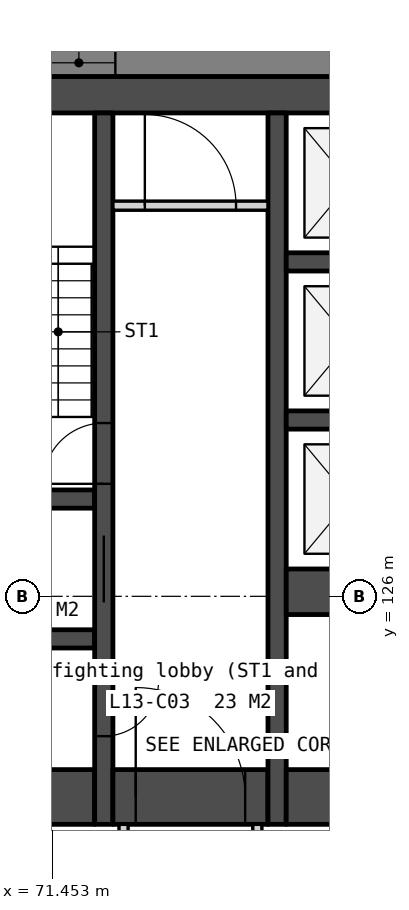
"""IFC4 building model, lengths in metres.
Left out: names, types, materials, properties, quantities, classifications, styles, units other than length and angle.
Written with IfcOpenShell. Run it as: python <this file> out.ifc"""

import sys

from ifc_helpers import new_model, si_unit, direction, frame, frame_2d, origin, place, context, subcontext, project, spatial, polyline, rectangle, outline, extrude, element, fill, save


model = new_model("IFC4")
c1 = context("Model", 3, precision=1e-05, world=origin(), true_north=direction((0.0, 1.0)))
c2 = subcontext(c1, "Body", "Model", "MODEL_VIEW")
j1 = project(units=[si_unit("LENGTHUNIT", "METRE"), si_unit("PLANEANGLEUNIT", "RADIAN")], contexts=[c1])
p1 = place(None, origin())
s1 = spatial("IfcSite", under=j1, at=p1, CompositionType="ELEMENT")
p2 = place(p1, origin())
s2 = spatial("IfcBuilding", under=s1, at=p2, CompositionType="ELEMENT")
p3 = place(p2, frame((0.0, 0.0, 59.5)))
s3 = spatial("IfcBuildingStorey", under=s2, at=p3, CompositionType="ELEMENT", Elevation=59.5)
p4 = place(p3, frame((66.0, 134.25, 0.0), z_axis=(0.0, 0.0, 1.0), x_axis=(1.0, 0.0, 0.0)))
e1 = element("IfcWall", 1, at=p4, inside=s3, PredefinedType="SOLIDWALL", context=c2, shape_type="SweptSolid", body=[
    extrude(rectangle(XDim=28.0, YDim=0.6, at=frame_2d((14.0, 0.0))), origin(), (0.0, 0.0, 1.0), 3.35),
])
for number, where, z_axis, x_axis in (
    (2, (69.6, 127.6, 0.0), (0.0, 0.0, 1.0), (1.0, 0.0, 0.0)),
    (3, (69.6, 125.3, 0.0), (0.0, 0.0, 1.0), (1.0, 0.0, 0.0)),
):
    element("IfcWall", number, at=place(p3, frame(where, z_axis=z_axis, x_axis=x_axis)), inside=s3, PredefinedType="SOLIDWALL", context=c2, shape_type="SweptSolid", body=[
        extrude(rectangle(XDim=2.55, YDim=0.3, at=frame_2d((1.275, 0.0))), origin(), (0.0, 0.0, 1.0), 3.35),
    ])
p5 = place(p3, frame((69.6, 122.7, 0.0), z_axis=(0.0, 0.0, 1.0), x_axis=(1.0, 0.0, 0.0)))
e4 = element("IfcWall", 4, at=p5, inside=s3, PredefinedType="SOLIDWALL", context=c2, shape_type="SweptSolid", body=[
    extrude(rectangle(XDim=2.55, YDim=0.9, at=frame_2d((1.275, 0.0))), origin(), (0.0, 0.0, 1.0), 3.35),
])
p6 = place(p3, frame((72.3, 133.95, 0.0), z_axis=(0.0, 0.0, 1.0), x_axis=(0.0, -1.0, 0.0)))
e5 = element("IfcWall", 5, at=p6, inside=s3, PredefinedType="SOLIDWALL", context=c2, shape_type="SweptSolid", body=[
    extrude(rectangle(XDim=11.7, YDim=0.3, at=frame_2d((5.85, 0.0))), origin(), (0.0, 0.0, 1.0), 3.35),
])
p7 = place(p6, frame((6.95, 0.0, 0.0)))
e6 = element("IfcOpeningElement", 6, at=p7, cuts=e5, PredefinedType="OPENING", context=c2, shape_type="SweptSolid", body=[
    extrude(rectangle(XDim=1.1, YDim=2.1, at=frame_2d((0.55, 1.05))), frame((0.0, 0.16, 0.0), z_axis=(0.0, -1.0, 0.0), x_axis=(1.0, 0.0, 0.0)), (0.0, 0.0, 1.0), 0.32),
])
p8 = place(p6, frame((9.35, 0.0, 0.0)))
e7 = element("IfcOpeningElement", 7, at=p8, cuts=e5, PredefinedType="OPENING", context=c2, shape_type="SweptSolid", body=[
    extrude(rectangle(XDim=0.9, YDim=2.1, at=frame_2d((0.45, 1.05))), frame((0.0, 0.16, 0.0), z_axis=(0.0, -1.0, 0.0), x_axis=(1.0, 0.0, 0.0)), (0.0, 0.0, 1.0), 0.32),
])
p9 = place(p6, frame((5.1, 0.0, 0.0)))
e8 = element("IfcOpeningElement", 8, at=p9, cuts=e5, PredefinedType="OPENING", context=c2, shape_type="SweptSolid", body=[
    extrude(rectangle(XDim=1.0, YDim=2.1, at=frame_2d((0.5, 1.05))), frame((0.0, 0.16, 0.0), z_axis=(0.0, -1.0, 0.0), x_axis=(1.0, 0.0, 0.0)), (0.0, 0.0, 1.0), 0.32),
])
p10 = place(p3, frame((72.45, 132.425, 0.0), z_axis=(0.0, 0.0, 1.0), x_axis=(1.0, 0.0, 0.0)))
e9 = element("IfcWall", 9, at=p10, inside=s3, PredefinedType="PARTITIONING", context=c2, shape_type="SweptSolid", body=[
    extrude(rectangle(XDim=2.55, YDim=0.15, at=frame_2d((1.275, 0.0))), origin(), (0.0, 0.0, 1.0), 3.35),
])
p11 = place(p10, frame((0.525, 0.0, 0.0)))
e10 = element("IfcOpeningElement", 10, at=p11, cuts=e9, PredefinedType="OPENING", context=c2, shape_type="SweptSolid", body=[
    extrude(rectangle(XDim=1.5, YDim=2.1, at=frame_2d((0.75, 1.05))), frame((0.0, 0.085, 0.0), z_axis=(0.0, -1.0, 0.0), x_axis=(1.0, 0.0, 0.0)), (0.0, 0.0, 1.0), 0.17),
])
p12 = place(p3, frame((72.45, 122.7, 0.0), z_axis=(0.0, 0.0, 1.0), x_axis=(1.0, 0.0, 0.0)))
e11 = element("IfcWall", 11, at=p12, inside=s3, PredefinedType="SOLIDWALL", context=c2, shape_type="SweptSolid", body=[
    extrude(rectangle(XDim=2.55, YDim=0.9, at=frame_2d((1.275, 0.0))), origin(), (0.0, 0.0, 1.0), 3.35),
])
p13 = place(p12, frame((0.375, 0.0, 0.0)))
e12 = element("IfcOpeningElement", 12, at=p13, cuts=e11, PredefinedType="OPENING", context=c2, shape_type="SweptSolid", body=[
    extrude(rectangle(XDim=1.8, YDim=2.1, at=frame_2d((0.9, 1.05))), frame((0.0, 0.46, 0.0), z_axis=(0.0, -1.0, 0.0), x_axis=(1.0, 0.0, 0.0)), (0.0, 0.0, 1.0), 0.92),
])
for number, where, z_axis, x_axis in (
    (13, (72.625, 122.25, 0.0), (0.0, 0.0, 1.0), (0.0, -1.0, 0.0)),
    (14, (74.825, 122.25, 0.0), (0.0, 0.0, 1.0), (0.0, -1.0, 0.0)),
):
    element("IfcWall", number, at=place(p3, frame(where, z_axis=z_axis, x_axis=x_axis)), inside=s3, PredefinedType="PARTITIONING", context=c2, shape_type="SweptSolid", body=[
        extrude(rectangle(XDim=2.1, YDim=0.15, at=frame_2d((1.05, 0.0))), origin(), (0.0, 0.0, 1.0), 3.35),
    ])
p14 = place(p3, frame((75.15, 133.95, 0.0), z_axis=(0.0, 0.0, 1.0), x_axis=(0.0, -1.0, 0.0)))
e15 = element("IfcWall", 15, at=p14, inside=s3, PredefinedType="SOLIDWALL", context=c2, shape_type="SweptSolid", body=[
    extrude(rectangle(XDim=11.7, YDim=0.3, at=frame_2d((5.85, 0.0))), origin(), (0.0, 0.0, 1.0), 3.35),
])
for number, where, z_axis, x_axis in (
    (16, (75.3, 131.5, 0.0), (0.0, 0.0, 1.0), (1.0, 0.0, 0.0)),
    (17, (75.3, 128.9, 0.0), (0.0, 0.0, 1.0), (1.0, 0.0, 0.0)),
):
    element("IfcWall", number, at=place(p3, frame(where, z_axis=z_axis, x_axis=x_axis)), inside=s3, PredefinedType="SOLIDWALL", context=c2, shape_type="SweptSolid", body=[
        extrude(rectangle(XDim=2.1, YDim=0.3, at=frame_2d((1.05, 0.0))), origin(), (0.0, 0.0, 1.0), 3.35),
    ])
p15 = place(p3, frame((75.3, 126.075, 0.0), z_axis=(0.0, 0.0, 1.0), x_axis=(1.0, 0.0, 0.0)))
e18 = element("IfcWall", 18, at=p15, inside=s3, PredefinedType="SOLIDWALL", context=c2, shape_type="SweptSolid", body=[
    extrude(rectangle(XDim=2.1, YDim=0.75, at=frame_2d((1.05, 0.0))), origin(), (0.0, 0.0, 1.0), 3.35),
])
p16 = place(p3, frame((75.3, 122.7, 0.0), z_axis=(0.0, 0.0, 1.0), x_axis=(1.0, 0.0, 0.0)))
e19 = element("IfcWall", 19, at=p16, inside=s3, PredefinedType="SOLIDWALL", context=c2, shape_type="SweptSolid", body=[
    extrude(rectangle(XDim=6.2, YDim=0.9, at=frame_2d((3.1, 0.0))), origin(), (0.0, 0.0, 1.0), 3.35),
])
p17 = place(p3, frame((102.4, 134.775, -0.15), z_axis=(0.0, 0.0, 1.0), x_axis=(-1.0, 0.0, 0.0)))
e20 = element("IfcWall", 20, at=p17, inside=s3, PredefinedType="SOLIDWALL", context=c2, shape_type="SweptSolid", body=[
    extrude(outline(polyline([(44.8, 0.0), (44.8, 3.5), (0.0, 3.5), (0.0, 0.0), (44.8, 0.0)])), frame((0.0, 0.225, 0.0), z_axis=(0.0, -1.0, 0.0), x_axis=(1.0, 0.0, 0.0)), (0.0, 0.0, 1.0), 0.45),
])
p18 = place(p17, frame((3.03, 0.0, 1.05)))
e21 = element("IfcOpeningElement", 21, at=p18, cuts=e20, PredefinedType="OPENING", context=c2, shape_type="SweptSolid", body=[
    extrude(rectangle(XDim=1.2, YDim=1.5, at=frame_2d((0.6, 0.75))), frame((0.0, 0.235, 0.0), z_axis=(0.0, -1.0, 0.0), x_axis=(1.0, 0.0, 0.0)), (0.0, 0.0, 1.0), 0.47),
])
p19 = place(p17, frame((4.73, 0.0, 1.05)))
e22 = element("IfcOpeningElement", 22, at=p19, cuts=e20, PredefinedType="OPENING", context=c2, shape_type="SweptSolid", body=[
    extrude(rectangle(XDim=1.2, YDim=1.5, at=frame_2d((0.6, 0.75))), frame((0.0, 0.235, 0.0), z_axis=(0.0, -1.0, 0.0), x_axis=(1.0, 0.0, 0.0)), (0.0, 0.0, 1.0), 0.47),
])
p20 = place(p17, frame((11.99, 0.0, 1.05)))
e23 = element("IfcOpeningElement", 23, at=p20, cuts=e20, PredefinedType="OPENING", context=c2, shape_type="SweptSolid", body=[
    extrude(rectangle(XDim=1.2, YDim=1.5, at=frame_2d((0.6, 0.75))), frame((0.0, 0.235, 0.0), z_axis=(0.0, -1.0, 0.0), x_axis=(1.0, 0.0, 0.0)), (0.0, 0.0, 1.0), 0.47),
])
p21 = place(p17, frame((13.69, 0.0, 1.05)))
e24 = element("IfcOpeningElement", 24, at=p21, cuts=e20, PredefinedType="OPENING", context=c2, shape_type="SweptSolid", body=[
    extrude(rectangle(XDim=1.2, YDim=1.5, at=frame_2d((0.6, 0.75))), frame((0.0, 0.235, 0.0), z_axis=(0.0, -1.0, 0.0), x_axis=(1.0, 0.0, 0.0)), (0.0, 0.0, 1.0), 0.47),
])
p22 = place(p17, frame((20.95, 0.0, 1.05)))
e25 = element("IfcOpeningElement", 25, at=p22, cuts=e20, PredefinedType="OPENING", context=c2, shape_type="SweptSolid", body=[
    extrude(rectangle(XDim=1.2, YDim=1.5, at=frame_2d((0.6, 0.75))), frame((0.0, 0.235, 0.0), z_axis=(0.0, -1.0, 0.0), x_axis=(1.0, 0.0, 0.0)), (0.0, 0.0, 1.0), 0.47),
])
p23 = place(p17, frame((22.65, 0.0, 1.05)))
e26 = element("IfcOpeningElement", 26, at=p23, cuts=e20, PredefinedType="OPENING", context=c2, shape_type="SweptSolid", body=[
    extrude(rectangle(XDim=1.2, YDim=1.5, at=frame_2d((0.6, 0.75))), frame((0.0, 0.235, 0.0), z_axis=(0.0, -1.0, 0.0), x_axis=(1.0, 0.0, 0.0)), (0.0, 0.0, 1.0), 0.47),
])
p24 = place(p17, frame((29.91, 0.0, 1.05)))
e27 = element("IfcOpeningElement", 27, at=p24, cuts=e20, PredefinedType="OPENING", context=c2, shape_type="SweptSolid", body=[
    extrude(rectangle(XDim=1.2, YDim=1.5, at=frame_2d((0.6, 0.75))), frame((0.0, 0.235, 0.0), z_axis=(0.0, -1.0, 0.0), x_axis=(1.0, 0.0, 0.0)), (0.0, 0.0, 1.0), 0.47),
])
p25 = place(p17, frame((31.61, 0.0, 1.05)))
e28 = element("IfcOpeningElement", 28, at=p25, cuts=e20, PredefinedType="OPENING", context=c2, shape_type="SweptSolid", body=[
    extrude(rectangle(XDim=1.2, YDim=1.5, at=frame_2d((0.6, 0.75))), frame((0.0, 0.235, 0.0), z_axis=(0.0, -1.0, 0.0), x_axis=(1.0, 0.0, 0.0)), (0.0, 0.0, 1.0), 0.47),
])
p26 = place(p17, frame((38.87, 0.0, 1.05)))
e29 = element("IfcOpeningElement", 29, at=p26, cuts=e20, PredefinedType="OPENING", context=c2, shape_type="SweptSolid", body=[
    extrude(rectangle(XDim=1.2, YDim=1.5, at=frame_2d((0.6, 0.75))), frame((0.0, 0.235, 0.0), z_axis=(0.0, -1.0, 0.0), x_axis=(1.0, 0.0, 0.0)), (0.0, 0.0, 1.0), 0.47),
])
p27 = place(p17, frame((40.57, 0.0, 1.05)))
e30 = element("IfcOpeningElement", 30, at=p27, cuts=e20, PredefinedType="OPENING", context=c2, shape_type="SweptSolid", body=[
    extrude(rectangle(XDim=1.2, YDim=1.5, at=frame_2d((0.6, 0.75))), frame((0.0, 0.235, 0.0), z_axis=(0.0, -1.0, 0.0), x_axis=(1.0, 0.0, 0.0)), (0.0, 0.0, 1.0), 0.47),
])
p28 = place(p3, frame((54.495, 129.397, -0.15), z_axis=(0.0, 0.0, 1.0), x_axis=(0.499999201451, -0.866025864826, 0.0)))
e31 = element("IfcWall", 31, at=p28, inside=s3, PredefinedType="SOLIDWALL", context=c2, shape_type="SweptSolid", body=[
    extrude(outline(polyline([(44.8, 0.0), (44.8, 3.5), (0.0, 3.5), (0.0, 0.0), (44.8, 0.0)])), frame((0.0, 0.225, 0.0), z_axis=(0.0, -1.0, 0.0), x_axis=(1.0, 0.0, 0.0)), (0.0, 0.0, 1.0), 0.45),
])
p29 = place(p28, frame((3.03, 0.0, 1.05)))
e32 = element("IfcOpeningElement", 32, at=p29, cuts=e31, PredefinedType="OPENING", context=c2, shape_type="SweptSolid", body=[
    extrude(rectangle(XDim=1.2, YDim=1.5, at=frame_2d((0.6, 0.75))), frame((0.0, 0.235, 0.0), z_axis=(0.0, -1.0, 0.0), x_axis=(1.0, 0.0, 0.0)), (0.0, 0.0, 1.0), 0.47),
])
p30 = place(p28, frame((4.73, 0.0, 1.05)))
e33 = element("IfcOpeningElement", 33, at=p30, cuts=e31, PredefinedType="OPENING", context=c2, shape_type="SweptSolid", body=[
    extrude(rectangle(XDim=1.2, YDim=1.5, at=frame_2d((0.6, 0.75))), frame((0.0, 0.235, 0.0), z_axis=(0.0, -1.0, 0.0), x_axis=(1.0, 0.0, 0.0)), (0.0, 0.0, 1.0), 0.47),
])
p31 = place(p28, frame((11.99, 0.0, 1.05)))
e34 = element("IfcOpeningElement", 34, at=p31, cuts=e31, PredefinedType="OPENING", context=c2, shape_type="SweptSolid", body=[
    extrude(rectangle(XDim=1.2, YDim=1.5, at=frame_2d((0.6, 0.75))), frame((0.0, 0.235, 0.0), z_axis=(0.0, -1.0, 0.0), x_axis=(1.0, 0.0, 0.0)), (0.0, 0.0, 1.0), 0.47),
])
p32 = place(p28, frame((13.69, 0.0, 1.05)))
e35 = element("IfcOpeningElement", 35, at=p32, cuts=e31, PredefinedType="OPENING", context=c2, shape_type="SweptSolid", body=[
    extrude(rectangle(XDim=1.2, YDim=1.5, at=frame_2d((0.6, 0.75))), frame((0.0, 0.235, 0.0), z_axis=(0.0, -1.0, 0.0), x_axis=(1.0, 0.0, 0.0)), (0.0, 0.0, 1.0), 0.47),
])
p33 = place(p28, frame((20.95, 0.0, 1.05)))
e36 = element("IfcOpeningElement", 36, at=p33, cuts=e31, PredefinedType="OPENING", context=c2, shape_type="SweptSolid", body=[
    extrude(rectangle(XDim=1.2, YDim=1.5, at=frame_2d((0.6, 0.75))), frame((0.0, 0.235, 0.0), z_axis=(0.0, -1.0, 0.0), x_axis=(1.0, 0.0, 0.0)), (0.0, 0.0, 1.0), 0.47),
])
p34 = place(p28, frame((22.65, 0.0, 1.05)))
e37 = element("IfcOpeningElement", 37, at=p34, cuts=e31, PredefinedType="OPENING", context=c2, shape_type="SweptSolid", body=[
    extrude(rectangle(XDim=1.2, YDim=1.5, at=frame_2d((0.6, 0.75))), frame((0.0, 0.235, 0.0), z_axis=(0.0, -1.0, 0.0), x_axis=(1.0, 0.0, 0.0)), (0.0, 0.0, 1.0), 0.47),
])
p35 = place(p28, frame((29.91, 0.0, 1.05)))
e38 = element("IfcOpeningElement", 38, at=p35, cuts=e31, PredefinedType="OPENING", context=c2, shape_type="SweptSolid", body=[
    extrude(rectangle(XDim=1.2, YDim=1.5, at=frame_2d((0.6, 0.75))), frame((0.0, 0.235, 0.0), z_axis=(0.0, -1.0, 0.0), x_axis=(1.0, 0.0, 0.0)), (0.0, 0.0, 1.0), 0.47),
])
p36 = place(p28, frame((31.61, 0.0, 1.05)))
e39 = element("IfcOpeningElement", 39, at=p36, cuts=e31, PredefinedType="OPENING", context=c2, shape_type="SweptSolid", body=[
    extrude(rectangle(XDim=1.2, YDim=1.5, at=frame_2d((0.6, 0.75))), frame((0.0, 0.235, 0.0), z_axis=(0.0, -1.0, 0.0), x_axis=(1.0, 0.0, 0.0)), (0.0, 0.0, 1.0), 0.47),
])
p37 = place(p28, frame((38.87, 0.0, 1.05)))
e40 = element("IfcOpeningElement", 40, at=p37, cuts=e31, PredefinedType="OPENING", context=c2, shape_type="SweptSolid", body=[
    extrude(rectangle(XDim=1.2, YDim=1.5, at=frame_2d((0.6, 0.75))), frame((0.0, 0.235, 0.0), z_axis=(0.0, -1.0, 0.0), x_axis=(1.0, 0.0, 0.0)), (0.0, 0.0, 1.0), 0.47),
])
p38 = place(p28, frame((40.57, 0.0, 1.05)))
e41 = element("IfcOpeningElement", 41, at=p38, cuts=e31, PredefinedType="OPENING", context=c2, shape_type="SweptSolid", body=[
    extrude(rectangle(XDim=1.2, YDim=1.5, at=frame_2d((0.6, 0.75))), frame((0.0, 0.235, 0.0), z_axis=(0.0, -1.0, 0.0), x_axis=(1.0, 0.0, 0.0)), (0.0, 0.0, 1.0), 0.47),
])
p39 = place(p7, origin())
e42 = element("IfcDoor", 42, at=p39, inside=s3, OperationType="SLIDING_TO_LEFT", PredefinedType="DOOR", context=c2, shape_type="SweptSolid", body=[
    extrude(rectangle(XDim=1.1, YDim=2.1, at=frame_2d((0.55, 1.05))), frame((0.0, 0.025, 0.0), z_axis=(0.0, -1.0, 0.0), x_axis=(1.0, 0.0, 0.0)), (0.0, 0.0, 1.0), 0.05),
])
fill(e6, e42)
p40 = place(p13, origin())
e43 = element("IfcDoor", 43, at=p40, inside=s3, OperationType="DOUBLE_DOOR_DOUBLE_SWING", PredefinedType="DOOR", context=c2, shape_type="SweptSolid", body=[
    extrude(rectangle(XDim=1.8, YDim=2.1, at=frame_2d((0.9, 1.05))), frame((0.0, 0.025, 0.0), z_axis=(0.0, -1.0, 0.0), x_axis=(1.0, 0.0, 0.0)), (0.0, 0.0, 1.0), 0.05),
])
fill(e12, e43)
p41 = place(p11, origin())
e44 = element("IfcDoor", 44, at=p41, inside=s3, OperationType="DOUBLE_DOOR_DOUBLE_SWING", PredefinedType="DOOR", context=c2, shape_type="SweptSolid", body=[
    extrude(rectangle(XDim=1.5, YDim=2.1, at=frame_2d((0.75, 1.05))), frame((0.0, 0.025, 0.0), z_axis=(0.0, -1.0, 0.0), x_axis=(1.0, 0.0, 0.0)), (0.0, 0.0, 1.0), 0.05),
])
fill(e10, e44)
p42 = place(p8, origin())
e45 = element("IfcDoor", 45, at=p42, inside=s3, OperationType="SINGLE_SWING_LEFT", PredefinedType="DOOR", context=c2, shape_type="SweptSolid", body=[
    extrude(rectangle(XDim=0.9, YDim=2.1, at=frame_2d((0.45, 1.05))), frame((0.0, 0.025, 0.0), z_axis=(0.0, -1.0, 0.0), x_axis=(1.0, 0.0, 0.0)), (0.0, 0.0, 1.0), 0.05),
])
fill(e7, e45)
p43 = place(p9, origin())
e46 = element("IfcDoor", 46, at=p43, inside=s3, OperationType="SINGLE_SWING_RIGHT", PredefinedType="DOOR", context=c2, shape_type="SweptSolid", body=[
    extrude(rectangle(XDim=1.0, YDim=2.1, at=frame_2d((0.5, 1.05))), frame((0.0, 0.025, 0.0), z_axis=(0.0, -1.0, 0.0), x_axis=(1.0, 0.0, 0.0)), (0.0, 0.0, 1.0), 0.05),
])
fill(e8, e46)
p44 = place(p24, origin())
e47 = element("IfcWindow", 47, at=p44, inside=s3, PartitioningType="SINGLE_PANEL", PredefinedType="WINDOW", context=c2, shape_type="SweptSolid", body=[
    extrude(rectangle(XDim=1.2, YDim=1.5, at=frame_2d((0.6, 0.75))), frame((0.0, 0.03, 0.0), z_axis=(0.0, -1.0, 0.0), x_axis=(1.0, 0.0, 0.0)), (0.0, 0.0, 1.0), 0.06),
])
fill(e27, e47)
save(model, sys.argv[1])
